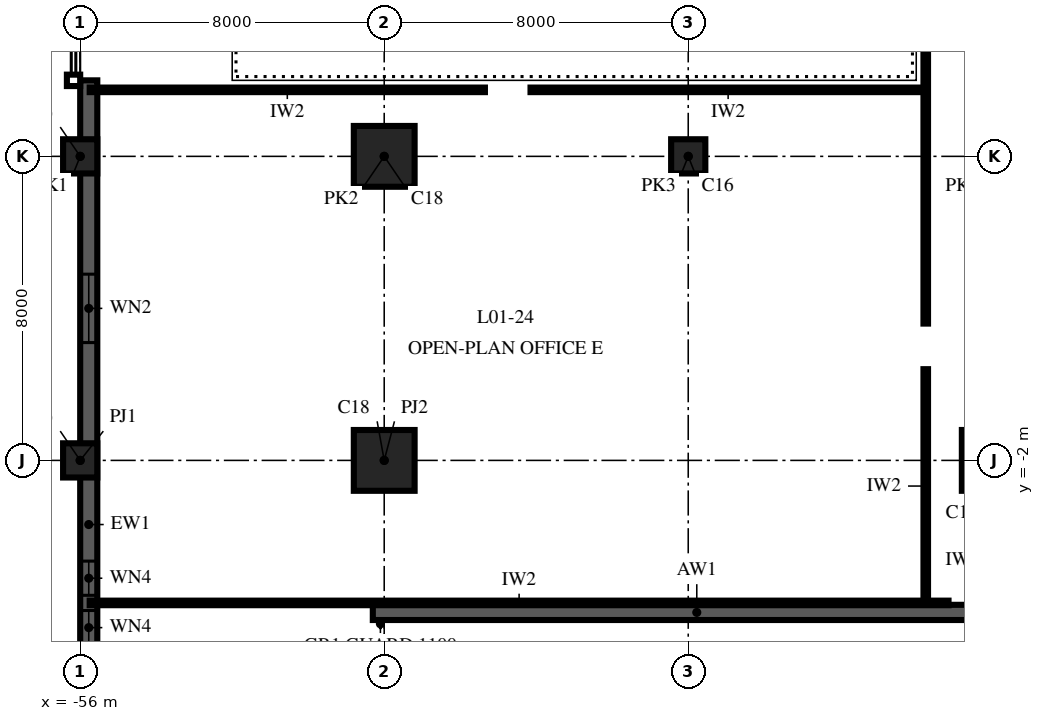
"""IFC4 building model, lengths in metres.
Left out: names, types, materials, properties, quantities, classifications, styles, units other than length and angle.
Written with IfcOpenShell. Run it as: python <this file> out.ifc"""

import sys

from ifc_helpers import new_model, si_unit, direction, frame, frame_2d, origin, origin_2d, place, context, subcontext, project, spatial, rectangle, extrude, element, fill, save


model = new_model("IFC4")
c1 = context("Model", 3, precision=1e-05, world=origin(), true_north=direction((0.0, 1.0)))
c2 = subcontext(c1, "Body", "Model", "MODEL_VIEW")
j1 = project(units=[si_unit("LENGTHUNIT", "METRE"), si_unit("PLANEANGLEUNIT", "RADIAN")], contexts=[c1])
p1 = place(None, origin())
s1 = spatial("IfcSite", under=j1, at=p1, CompositionType="ELEMENT")
p2 = place(p1, origin())
s2 = spatial("IfcBuilding", under=s1, at=p2, CompositionType="ELEMENT")
p3 = place(p2, frame((0.0, 0.0, 6.0)))
s3 = spatial("IfcBuildingStorey", under=s2, at=p3, CompositionType="ELEMENT", Elevation=6.0)
for number, where, z_axis, x_axis in (
    (1, (-56.0, -2.0, 0.0), (0.0, 0.0, 1.0), (1.0, 0.0, 0.0)),
    (2, (-56.0, 6.0, 0.0), (0.0, 0.0, 1.0), (1.0, 0.0, 0.0)),
):
    element("IfcColumn", number, at=place(p3, frame(where, z_axis=z_axis, x_axis=x_axis)), inside=s3, PredefinedType="COLUMN", context=c2, shape_type="SweptSolid", body=[
        extrude(rectangle(XDim=0.9, YDim=0.9, at=origin_2d()), origin(), (0.0, 0.0, 1.0), 6.0),
    ])
for number, where, z_axis, x_axis in (
    (3, (-48.0, -2.0, 0.0), (0.0, 0.0, 1.0), (1.0, 0.0, 0.0)),
    (4, (-48.0, 6.0, 0.0), (0.0, 0.0, 1.0), (1.0, 0.0, 0.0)),
):
    element("IfcColumn", number, at=place(p3, frame(where, z_axis=z_axis, x_axis=x_axis)), inside=s3, PredefinedType="COLUMN", context=c2, shape_type="SweptSolid", body=[
        extrude(rectangle(XDim=1.6, YDim=1.6, at=origin_2d()), origin(), (0.0, 0.0, 1.0), 6.0),
    ])
p4 = place(p3, frame((-40.0, 6.0, 0.0), z_axis=(0.0, 0.0, 1.0), x_axis=(1.0, 0.0, 0.0)))
e5 = element("IfcColumn", 5, at=p4, inside=s3, PredefinedType="COLUMN", context=c2, shape_type="SweptSolid", body=[
    extrude(rectangle(XDim=0.9, YDim=0.9, at=origin_2d()), origin(), (0.0, 0.0, 1.0), 6.0),
])
p5 = place(p3, frame((-32.0, -2.0, 0.0), z_axis=(0.0, 0.0, 1.0), x_axis=(1.0, 0.0, 0.0)))
e6 = element("IfcColumn", 6, at=p5, inside=s3, PredefinedType="COLUMN", context=c2, shape_type="SweptSolid", body=[
    extrude(rectangle(XDim=1.6, YDim=1.6, at=origin_2d()), origin(), (0.0, 0.0, 1.0), 6.0),
])
p6 = place(p3, frame((-48.3, -6.0, 0.0), z_axis=(0.0, 0.0, 1.0), x_axis=(1.0, 0.0, 0.0)))
e7 = element("IfcWall", 7, at=p6, inside=s3, PredefinedType="SHEAR", context=c2, shape_type="SweptSolid", body=[
    extrude(rectangle(XDim=17.05, YDim=0.4, at=frame_2d((8.525, 0.0))), origin(), (0.0, 0.0, 1.0), 6.0),
])
p7 = place(p3, frame((-55.775, 8.0, 0.0), z_axis=(0.0, 0.0, 1.0), x_axis=(0.0, -1.0, 0.0)))
e8 = element("IfcWall", 8, at=p7, inside=s3, PredefinedType="SOLIDWALL", context=c2, shape_type="SweptSolid", body=[
    extrude(rectangle(XDim=81.55, YDim=0.45, at=frame_2d((40.775, 0.0))), origin(), (0.0, 0.0, 1.0), 6.0),
])
p8 = place(p7, frame((5.1, 0.0, 1.0)))
e9 = element("IfcOpeningElement", 9, at=p8, cuts=e8, PredefinedType="OPENING", context=c2, shape_type="SweptSolid", body=[
    extrude(rectangle(XDim=1.8, YDim=3.0, at=frame_2d((0.9, 1.5))), frame((0.0, 0.24, 0.0), z_axis=(0.0, -1.0, 0.0), x_axis=(1.0, 0.0, 0.0)), (0.0, 0.0, 1.0), 0.48),
])
p9 = place(p7, frame((12.65, 0.0, 1.0)))
e10 = element("IfcOpeningElement", 10, at=p9, cuts=e8, PredefinedType="OPENING", context=c2, shape_type="SweptSolid", body=[
    extrude(rectangle(XDim=0.9, YDim=3.0, at=frame_2d((0.45, 1.5))), frame((0.0, 0.24, 0.0), z_axis=(0.0, -1.0, 0.0), x_axis=(1.0, 0.0, 0.0)), (0.0, 0.0, 1.0), 0.48),
])
p10 = place(p7, frame((13.95, 0.0, 1.0)))
e11 = element("IfcOpeningElement", 11, at=p10, cuts=e8, PredefinedType="OPENING", context=c2, shape_type="SweptSolid", body=[
    extrude(rectangle(XDim=0.9, YDim=3.0, at=frame_2d((0.45, 1.5))), frame((0.0, 0.24, 0.0), z_axis=(0.0, -1.0, 0.0), x_axis=(1.0, 0.0, 0.0)), (0.0, 0.0, 1.0), 0.48),
])
p11 = place(p7, frame((20.9, 0.0, 1.0)))
e12 = element("IfcOpeningElement", 12, at=p11, cuts=e8, PredefinedType="OPENING", context=c2, shape_type="SweptSolid", body=[
    extrude(rectangle(XDim=0.9, YDim=3.0, at=frame_2d((0.45, 1.5))), frame((0.0, 0.24, 0.0), z_axis=(0.0, -1.0, 0.0), x_axis=(1.0, 0.0, 0.0)), (0.0, 0.0, 1.0), 0.48),
])
p12 = place(p7, frame((22.2, 0.0, 1.0)))
e13 = element("IfcOpeningElement", 13, at=p12, cuts=e8, PredefinedType="OPENING", context=c2, shape_type="SweptSolid", body=[
    extrude(rectangle(XDim=0.9, YDim=3.0, at=frame_2d((0.45, 1.5))), frame((0.0, 0.24, 0.0), z_axis=(0.0, -1.0, 0.0), x_axis=(1.0, 0.0, 0.0)), (0.0, 0.0, 1.0), 0.48),
])
p13 = place(p7, frame((29.1, 0.0, 1.0)))
e14 = element("IfcOpeningElement", 14, at=p13, cuts=e8, PredefinedType="OPENING", context=c2, shape_type="SweptSolid", body=[
    extrude(rectangle(XDim=1.8, YDim=3.0, at=frame_2d((0.9, 1.5))), frame((0.0, 0.24, 0.0), z_axis=(0.0, -1.0, 0.0), x_axis=(1.0, 0.0, 0.0)), (0.0, 0.0, 1.0), 0.48),
])
p14 = place(p7, frame((37.1, 0.0, 1.0)))
e15 = element("IfcOpeningElement", 15, at=p14, cuts=e8, PredefinedType="OPENING", context=c2, shape_type="SweptSolid", body=[
    extrude(rectangle(XDim=1.8, YDim=3.0, at=frame_2d((0.9, 1.5))), frame((0.0, 0.24, 0.0), z_axis=(0.0, -1.0, 0.0), x_axis=(1.0, 0.0, 0.0)), (0.0, 0.0, 1.0), 0.48),
])
p15 = place(p7, frame((45.1, 0.0, 1.0)))
e16 = element("IfcOpeningElement", 16, at=p15, cuts=e8, PredefinedType="OPENING", context=c2, shape_type="SweptSolid", body=[
    extrude(rectangle(XDim=1.8, YDim=3.0, at=frame_2d((0.9, 1.5))), frame((0.0, 0.24, 0.0), z_axis=(0.0, -1.0, 0.0), x_axis=(1.0, 0.0, 0.0)), (0.0, 0.0, 1.0), 0.48),
])
p16 = place(p7, frame((53.1, 0.0, 1.0)))
e17 = element("IfcOpeningElement", 17, at=p16, cuts=e8, PredefinedType="OPENING", context=c2, shape_type="SweptSolid", body=[
    extrude(rectangle(XDim=1.8, YDim=3.0, at=frame_2d((0.9, 1.5))), frame((0.0, 0.24, 0.0), z_axis=(0.0, -1.0, 0.0), x_axis=(1.0, 0.0, 0.0)), (0.0, 0.0, 1.0), 0.48),
])
p17 = place(p7, frame((61.1, 0.0, 1.0)))
e18 = element("IfcOpeningElement", 18, at=p17, cuts=e8, PredefinedType="OPENING", context=c2, shape_type="SweptSolid", body=[
    extrude(rectangle(XDim=1.8, YDim=3.0, at=frame_2d((0.9, 1.5))), frame((0.0, 0.24, 0.0), z_axis=(0.0, -1.0, 0.0), x_axis=(1.0, 0.0, 0.0)), (0.0, 0.0, 1.0), 0.48),
])
p18 = place(p7, frame((69.1, 0.0, 1.0)))
e19 = element("IfcOpeningElement", 19, at=p18, cuts=e8, PredefinedType="OPENING", context=c2, shape_type="SweptSolid", body=[
    extrude(rectangle(XDim=1.8, YDim=3.0, at=frame_2d((0.9, 1.5))), frame((0.0, 0.24, 0.0), z_axis=(0.0, -1.0, 0.0), x_axis=(1.0, 0.0, 0.0)), (0.0, 0.0, 1.0), 0.48),
])
p19 = place(p7, frame((76.875, 0.0, 1.0)))
e20 = element("IfcOpeningElement", 20, at=p19, cuts=e8, PredefinedType="OPENING", context=c2, shape_type="SweptSolid", body=[
    extrude(rectangle(XDim=1.8, YDim=3.0, at=frame_2d((0.9, 1.5))), frame((0.0, 0.24, 0.0), z_axis=(0.0, -1.0, 0.0), x_axis=(1.0, 0.0, 0.0)), (0.0, 0.0, 1.0), 0.48),
])
p20 = place(p3, frame((-33.75, -5.75, 0.0), z_axis=(0.0, 0.0, 1.0), x_axis=(0.0, 1.0, 0.0)))
e21 = element("IfcWall", 21, at=p20, inside=s3, PredefinedType="PARTITIONING", context=c2, shape_type="SweptSolid", body=[
    extrude(rectangle(XDim=6.15, YDim=0.12, at=frame_2d((3.075, 0.0))), origin(), (0.0, 0.0, 1.0), 5.7),
])
p21 = place(p3, frame((-33.75, 1.6, 0.0), z_axis=(0.0, 0.0, 1.0), x_axis=(0.0, 1.0, 0.0)))
e22 = element("IfcWall", 22, at=p21, inside=s3, PredefinedType="PARTITIONING", context=c2, shape_type="SweptSolid", body=[
    extrude(rectangle(XDim=28.15, YDim=0.12, at=frame_2d((14.075, 0.0))), origin(), (0.0, 0.0, 1.0), 5.7),
])
p22 = place(p3, frame((-55.75, -5.75, 0.0), z_axis=(0.0, 0.0, 1.0), x_axis=(1.0, 0.0, 0.0)))
e23 = element("IfcWall", 23, at=p22, inside=s3, PredefinedType="PARTITIONING", context=c2, shape_type="SweptSolid", body=[
    extrude(rectangle(XDim=22.6, YDim=0.12, at=frame_2d((11.3, 0.0))), origin(), (0.0, 0.0, 1.0), 5.7),
])
for number, where, z_axis, x_axis in (
    (24, (-55.75, 7.75, 0.0), (0.0, 0.0, 1.0), (1.0, 0.0, 0.0)),
    (25, (-44.15, 7.75, 0.0), (0.0, 0.0, 1.0), (1.0, 0.0, 0.0)),
):
    element("IfcWall", number, at=place(p3, frame(where, z_axis=z_axis, x_axis=x_axis)), inside=s3, PredefinedType="PARTITIONING", context=c2, shape_type="SweptSolid", body=[
        extrude(rectangle(XDim=10.4, YDim=0.12, at=frame_2d((5.2, 0.0))), origin(), (0.0, 0.0, 1.0), 5.7),
    ])
p23 = place(p8, origin())
e26 = element("IfcWindow", 26, at=p23, inside=s3, PartitioningType="SINGLE_PANEL", PredefinedType="WINDOW", context=c2, shape_type="SweptSolid", body=[
    extrude(rectangle(XDim=1.8, YDim=3.0, at=frame_2d((0.9, 1.5))), frame((0.0, 0.03, 0.0), z_axis=(0.0, -1.0, 0.0), x_axis=(1.0, 0.0, 0.0)), (0.0, 0.0, 1.0), 0.06),
])
fill(e9, e26)
p24 = place(p9, origin())
e27 = element("IfcWindow", 27, at=p24, inside=s3, PartitioningType="SINGLE_PANEL", PredefinedType="WINDOW", context=c2, shape_type="SweptSolid", body=[
    extrude(rectangle(XDim=0.9, YDim=3.0, at=frame_2d((0.45, 1.5))), frame((0.0, 0.03, 0.0), z_axis=(0.0, -1.0, 0.0), x_axis=(1.0, 0.0, 0.0)), (0.0, 0.0, 1.0), 0.06),
])
fill(e10, e27)
p25 = place(p10, origin())
e28 = element("IfcWindow", 28, at=p25, inside=s3, PartitioningType="SINGLE_PANEL", PredefinedType="WINDOW", context=c2, shape_type="SweptSolid", body=[
    extrude(rectangle(XDim=0.9, YDim=3.0, at=frame_2d((0.45, 1.5))), frame((0.0, 0.03, 0.0), z_axis=(0.0, -1.0, 0.0), x_axis=(1.0, 0.0, 0.0)), (0.0, 0.0, 1.0), 0.06),
])
fill(e11, e28)
save(model, sys.argv[1])
